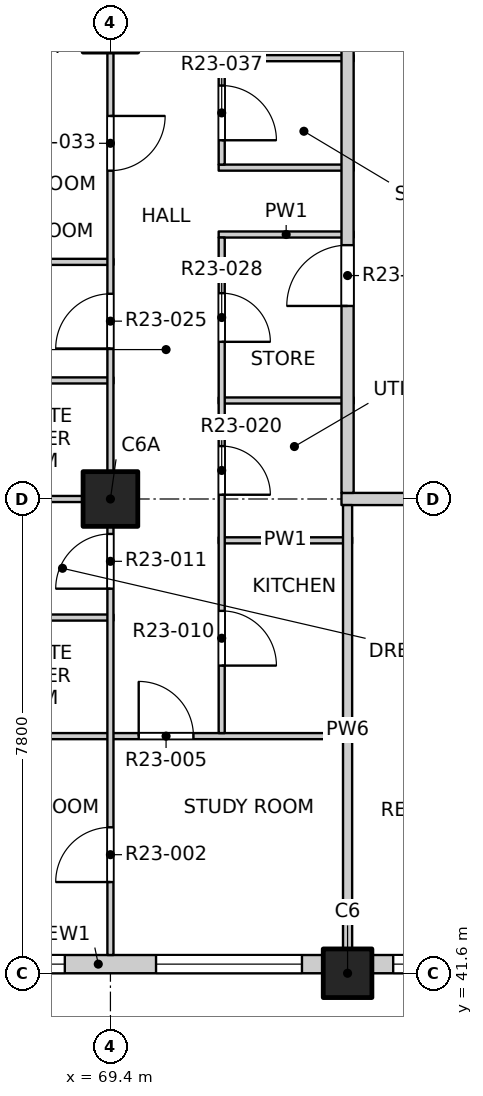
"""IFC4 building model, lengths in metres.
Left out: names, types, materials, properties, quantities, classifications, styles, units other than length and angle.
Written with IfcOpenShell. Run it as: python <this file> out.ifc"""

import sys

from ifc_helpers import new_model, si_unit, direction, frame, frame_2d, origin, origin_2d, place, context, subcontext, project, spatial, rectangle, extrude, element, fill, save


model = new_model("IFC4")
c1 = context("Model", 3, precision=1e-05, world=origin(), true_north=direction((0.0, 1.0)))
c2 = subcontext(c1, "Body", "Model", "MODEL_VIEW")
j1 = project(units=[si_unit("LENGTHUNIT", "METRE"), si_unit("PLANEANGLEUNIT", "RADIAN")], contexts=[c1])
p1 = place(None, origin())
s1 = spatial("IfcSite", under=j1, at=p1, CompositionType="ELEMENT")
p2 = place(p1, origin())
s2 = spatial("IfcBuilding", under=s1, at=p2, CompositionType="ELEMENT")
p3 = place(p2, frame((0.0, 0.0, 238.1)))
s3 = spatial("IfcBuildingStorey", under=s2, at=p3, CompositionType="ELEMENT", Elevation=238.1)
p4 = place(p3, frame((73.3, 41.6, -0.25), z_axis=(0.0, 0.0, 1.0), x_axis=(1.0, 0.0, 0.0)))
e1 = element("IfcColumn", 1, at=p4, inside=s3, PredefinedType="COLUMN", context=c2, shape_type="SweptSolid", body=[
    extrude(rectangle(XDim=0.8, YDim=0.8, at=origin_2d()), origin(), (0.0, 0.0, 1.0), 3.35),
])
p5 = place(p3, frame((69.4, 49.4, -0.25), z_axis=(0.0, 0.0, 1.0), x_axis=(1.0, 0.0, 0.0)))
e2 = element("IfcColumn", 2, at=p5, inside=s3, PredefinedType="COLUMN", context=c2, shape_type="SweptSolid", body=[
    extrude(rectangle(XDim=0.9, YDim=0.9, at=origin_2d()), origin(), (0.0, 0.0, 1.0), 3.35),
])
p6 = place(p3, frame((65.5, 41.75, 0.0), z_axis=(0.0, 0.0, 1.0), x_axis=(1.0, 0.0, 0.0)))
e3 = element("IfcWall", 3, at=p6, inside=s3, PredefinedType="SOLIDWALL", context=c2, shape_type="SweptSolid", body=[
    extrude(rectangle(XDim=7.4, YDim=0.3, at=frame_2d((3.7, 0.0))), origin(), (0.0, 0.0, 1.0), 3.1),
])
p7 = place(p6, frame((0.75, 0.0, 0.9)))
e4 = element("IfcOpeningElement", 4, at=p7, cuts=e3, PredefinedType="OPENING", context=c2, shape_type="SweptSolid", body=[
    extrude(rectangle(XDim=2.4, YDim=1.8, at=frame_2d((1.2, 0.9))), frame((0.0, 0.16, 0.0), z_axis=(0.0, -1.0, 0.0), x_axis=(1.0, 0.0, 0.0)), (0.0, 0.0, 1.0), 0.32),
])
p8 = place(p6, frame((4.65, 0.0, 0.9)))
e5 = element("IfcOpeningElement", 5, at=p8, cuts=e3, PredefinedType="OPENING", context=c2, shape_type="SweptSolid", body=[
    extrude(rectangle(XDim=2.4, YDim=1.8, at=frame_2d((1.2, 0.9))), frame((0.0, 0.16, 0.0), z_axis=(0.0, -1.0, 0.0), x_axis=(1.0, 0.0, 0.0)), (0.0, 0.0, 1.0), 0.32),
])
p9 = place(p3, frame((73.7, 41.75, 0.0), z_axis=(0.0, 0.0, 1.0), x_axis=(1.0, 0.0, 0.0)))
e6 = element("IfcWall", 6, at=p9, inside=s3, PredefinedType="SOLIDWALL", context=c2, shape_type="SweptSolid", body=[
    extrude(rectangle(XDim=7.0, YDim=0.3, at=frame_2d((3.5, 0.0))), origin(), (0.0, 0.0, 1.0), 3.1),
])
p10 = place(p9, frame((0.35, 0.0, 0.9)))
e7 = element("IfcOpeningElement", 7, at=p10, cuts=e6, PredefinedType="OPENING", context=c2, shape_type="SweptSolid", body=[
    extrude(rectangle(XDim=2.4, YDim=1.8, at=frame_2d((1.2, 0.9))), frame((0.0, 0.16, 0.0), z_axis=(0.0, -1.0, 0.0), x_axis=(1.0, 0.0, 0.0)), (0.0, 0.0, 1.0), 0.32),
])
p11 = place(p9, frame((4.25, 0.0, 0.9)))
e8 = element("IfcOpeningElement", 8, at=p11, cuts=e6, PredefinedType="OPENING", context=c2, shape_type="SweptSolid", body=[
    extrude(rectangle(XDim=2.4, YDim=1.8, at=frame_2d((1.2, 0.9))), frame((0.0, 0.16, 0.0), z_axis=(0.0, -1.0, 0.0), x_axis=(1.0, 0.0, 0.0)), (0.0, 0.0, 1.0), 0.32),
])
p12 = place(p3, frame((61.9, 45.5, 0.0), z_axis=(0.0, 0.0, 1.0), x_axis=(1.0, 0.0, 0.0)))
e9 = element("IfcWall", 9, at=p12, inside=s3, PredefinedType="PARTITIONING", context=c2, shape_type="SweptSolid", body=[
    extrude(rectangle(XDim=11.475, YDim=0.1, at=frame_2d((5.737, 0.0))), origin(), (0.0, 0.0, 1.0), 3.1),
])
p13 = place(p12, frame((7.965, 0.0, 0.0)))
e10 = element("IfcOpeningElement", 10, at=p13, cuts=e9, PredefinedType="OPENING", context=c2, shape_type="SweptSolid", body=[
    extrude(rectangle(XDim=0.9, YDim=2.1, at=frame_2d((0.45, 1.05))), frame((0.0, 0.06, 0.0), z_axis=(0.0, -1.0, 0.0), x_axis=(1.0, 0.0, 0.0)), (0.0, 0.0, 1.0), 0.12),
])
p14 = place(p3, frame((66.05, 47.45, 0.0), z_axis=(0.0, 0.0, 1.0), x_axis=(1.0, 0.0, 0.0)))
e11 = element("IfcWall", 11, at=p14, inside=s3, PredefinedType="PARTITIONING", context=c2, shape_type="SweptSolid", body=[
    extrude(rectangle(XDim=3.4, YDim=0.1, at=frame_2d((1.7, 0.0))), origin(), (0.0, 0.0, 1.0), 3.1),
])
p15 = place(p3, frame((71.18, 48.72, 0.0), z_axis=(0.0, 0.0, 1.0), x_axis=(1.0, 0.0, 0.0)))
e12 = element("IfcWall", 12, at=p15, inside=s3, PredefinedType="PARTITIONING", context=c2, shape_type="SweptSolid", body=[
    extrude(rectangle(XDim=2.195, YDim=0.1, at=frame_2d((1.097, 0.0))), origin(), (0.0, 0.0, 1.0), 3.1),
])
p16 = place(p3, frame((61.9, 49.4, 0.0), z_axis=(0.0, 0.0, 1.0), x_axis=(1.0, 0.0, 0.0)))
e13 = element("IfcWall", 13, at=p16, inside=s3, PredefinedType="PARTITIONING", context=c2, shape_type="SweptSolid", body=[
    extrude(rectangle(XDim=7.55, YDim=0.1, at=frame_2d((3.775, 0.0))), origin(), (0.0, 0.0, 1.0), 3.1),
])
p17 = place(p3, frame((73.2, 49.4, 0.0), z_axis=(0.0, 0.0, 1.0), x_axis=(1.0, 0.0, 0.0)))
e14 = element("IfcWall", 14, at=p17, inside=s3, PredefinedType="PARTITIONING", context=c2, shape_type="SweptSolid", body=[
    extrude(rectangle(XDim=23.6, YDim=0.2, at=frame_2d((11.8, 0.0))), origin(), (0.0, 0.0, 1.0), 3.1),
])
p18 = place(p17, frame((2.25, 0.0, 0.0)))
e15 = element("IfcOpeningElement", 15, at=p18, cuts=e14, PredefinedType="OPENING", context=c2, shape_type="SweptSolid", body=[
    extrude(rectangle(XDim=1.2, YDim=2.1, at=frame_2d((0.6, 1.05))), frame((0.0, 0.11, 0.0), z_axis=(0.0, -1.0, 0.0), x_axis=(1.0, 0.0, 0.0)), (0.0, 0.0, 1.0), 0.22),
])
p19 = place(p17, frame((9.4, 0.0, 0.0)))
e16 = element("IfcOpeningElement", 16, at=p19, cuts=e14, PredefinedType="OPENING", context=c2, shape_type="SweptSolid", body=[
    extrude(rectangle(XDim=0.9, YDim=2.1, at=frame_2d((0.45, 1.05))), frame((0.0, 0.11, 0.0), z_axis=(0.0, -1.0, 0.0), x_axis=(1.0, 0.0, 0.0)), (0.0, 0.0, 1.0), 0.22),
])
p20 = place(p17, frame((15.1, 0.0, 0.0)))
e17 = element("IfcOpeningElement", 17, at=p20, cuts=e14, PredefinedType="OPENING", context=c2, shape_type="SweptSolid", body=[
    extrude(rectangle(XDim=1.2, YDim=2.1, at=frame_2d((0.6, 1.05))), frame((0.0, 0.11, 0.0), z_axis=(0.0, -1.0, 0.0), x_axis=(1.0, 0.0, 0.0)), (0.0, 0.0, 1.0), 0.22),
])
p21 = place(p17, frame((21.1, 0.0, 0.0)))
e18 = element("IfcOpeningElement", 18, at=p21, cuts=e14, PredefinedType="OPENING", context=c2, shape_type="SweptSolid", body=[
    extrude(rectangle(XDim=0.9, YDim=2.1, at=frame_2d((0.45, 1.05))), frame((0.0, 0.11, 0.0), z_axis=(0.0, -1.0, 0.0), x_axis=(1.0, 0.0, 0.0)), (0.0, 0.0, 1.0), 0.22),
])
p22 = place(p3, frame((71.18, 51.02, 0.0), z_axis=(0.0, 0.0, 1.0), x_axis=(1.0, 0.0, 0.0)))
e19 = element("IfcWall", 19, at=p22, inside=s3, PredefinedType="PARTITIONING", context=c2, shape_type="SweptSolid", body=[
    extrude(rectangle(XDim=2.22, YDim=0.1, at=frame_2d((1.11, 0.0))), origin(), (0.0, 0.0, 1.0), 3.1),
])
p23 = place(p3, frame((66.05, 51.35, 0.0), z_axis=(0.0, 0.0, 1.0), x_axis=(1.0, 0.0, 0.0)))
e20 = element("IfcWall", 20, at=p23, inside=s3, PredefinedType="PARTITIONING", context=c2, shape_type="SweptSolid", body=[
    extrude(rectangle(XDim=3.4, YDim=0.1, at=frame_2d((1.7, 0.0))), origin(), (0.0, 0.0, 1.0), 3.1),
])
p24 = place(p3, frame((61.9, 53.3, 0.0), z_axis=(0.0, 0.0, 1.0), x_axis=(1.0, 0.0, 0.0)))
e21 = element("IfcWall", 21, at=p24, inside=s3, PredefinedType="PARTITIONING", context=c2, shape_type="SweptSolid", body=[
    extrude(rectangle(XDim=7.55, YDim=0.1, at=frame_2d((3.775, 0.0))), origin(), (0.0, 0.0, 1.0), 3.1),
])
for number, where, z_axis, x_axis in (
    (22, (71.18, 53.75, 0.0), (0.0, 0.0, 1.0), (1.0, 0.0, 0.0)),
    (23, (71.18, 54.85, 0.0), (0.0, 0.0, 1.0), (1.0, 0.0, 0.0)),
    (24, (71.18, 56.65, 0.0), (0.0, 0.0, 1.0), (1.0, 0.0, 0.0)),
):
    element("IfcWall", number, at=place(p3, frame(where, z_axis=z_axis, x_axis=x_axis)), inside=s3, PredefinedType="PARTITIONING", context=c2, shape_type="SweptSolid", body=[
        extrude(rectangle(XDim=2.22, YDim=0.1, at=frame_2d((1.11, 0.0))), origin(), (0.0, 0.0, 1.0), 3.1),
    ])
p25 = place(p3, frame((69.4, 41.9, 0.0), z_axis=(0.0, 0.0, 1.0), x_axis=(0.0, 1.0, 0.0)))
e25 = element("IfcWall", 25, at=p25, inside=s3, PredefinedType="PARTITIONING", context=c2, shape_type="SweptSolid", body=[
    extrude(rectangle(XDim=46.2, YDim=0.1, at=frame_2d((23.1, 0.0))), origin(), (0.0, 0.0, 1.0), 3.1),
])
p26 = place(p25, frame((1.2, 0.0, 0.0)))
e26 = element("IfcOpeningElement", 26, at=p26, cuts=e25, PredefinedType="OPENING", context=c2, shape_type="SweptSolid", body=[
    extrude(rectangle(XDim=0.9, YDim=2.1, at=frame_2d((0.45, 1.05))), frame((0.0, 0.06, 0.0), z_axis=(0.0, -1.0, 0.0), x_axis=(1.0, 0.0, 0.0)), (0.0, 0.0, 1.0), 0.12),
])
p27 = place(p25, frame((6.025, 0.0, 0.0)))
e27 = element("IfcOpeningElement", 27, at=p27, cuts=e25, PredefinedType="OPENING", context=c2, shape_type="SweptSolid", body=[
    extrude(rectangle(XDim=0.9, YDim=2.1, at=frame_2d((0.45, 1.05))), frame((0.0, 0.06, 0.0), z_axis=(0.0, -1.0, 0.0), x_axis=(1.0, 0.0, 0.0)), (0.0, 0.0, 1.0), 0.12),
])
p28 = place(p25, frame((9.975, 0.0, 0.0)))
e28 = element("IfcOpeningElement", 28, at=p28, cuts=e25, PredefinedType="OPENING", context=c2, shape_type="SweptSolid", body=[
    extrude(rectangle(XDim=0.9, YDim=2.1, at=frame_2d((0.45, 1.05))), frame((0.0, 0.06, 0.0), z_axis=(0.0, -1.0, 0.0), x_axis=(1.0, 0.0, 0.0)), (0.0, 0.0, 1.0), 0.12),
])
p29 = place(p25, frame((12.9, 0.0, 0.0)))
e29 = element("IfcOpeningElement", 29, at=p29, cuts=e25, PredefinedType="OPENING", context=c2, shape_type="SweptSolid", body=[
    extrude(rectangle(XDim=0.9, YDim=2.1, at=frame_2d((0.45, 1.05))), frame((0.0, 0.06, 0.0), z_axis=(0.0, -1.0, 0.0), x_axis=(1.0, 0.0, 0.0)), (0.0, 0.0, 1.0), 0.12),
])
p30 = place(p25, frame((17.775, 0.0, 0.0)))
e30 = element("IfcOpeningElement", 30, at=p30, cuts=e25, PredefinedType="OPENING", context=c2, shape_type="SweptSolid", body=[
    extrude(rectangle(XDim=0.9, YDim=2.1, at=frame_2d((0.45, 1.05))), frame((0.0, 0.06, 0.0), z_axis=(0.0, -1.0, 0.0), x_axis=(1.0, 0.0, 0.0)), (0.0, 0.0, 1.0), 0.12),
])
p31 = place(p25, frame((21.625, 0.0, 0.0)))
e31 = element("IfcOpeningElement", 31, at=p31, cuts=e25, PredefinedType="OPENING", context=c2, shape_type="SweptSolid", body=[
    extrude(rectangle(XDim=0.9, YDim=2.1, at=frame_2d((0.45, 1.05))), frame((0.0, 0.06, 0.0), z_axis=(0.0, -1.0, 0.0), x_axis=(1.0, 0.0, 0.0)), (0.0, 0.0, 1.0), 0.12),
])
p32 = place(p25, frame((25.575, 0.0, 0.0)))
e32 = element("IfcOpeningElement", 32, at=p32, cuts=e25, PredefinedType="OPENING", context=c2, shape_type="SweptSolid", body=[
    extrude(rectangle(XDim=0.9, YDim=2.1, at=frame_2d((0.45, 1.05))), frame((0.0, 0.06, 0.0), z_axis=(0.0, -1.0, 0.0), x_axis=(1.0, 0.0, 0.0)), (0.0, 0.0, 1.0), 0.12),
])
p33 = place(p25, frame((28.5, 0.0, 0.0)))
e33 = element("IfcOpeningElement", 33, at=p33, cuts=e25, PredefinedType="OPENING", context=c2, shape_type="SweptSolid", body=[
    extrude(rectangle(XDim=0.9, YDim=2.1, at=frame_2d((0.45, 1.05))), frame((0.0, 0.06, 0.0), z_axis=(0.0, -1.0, 0.0), x_axis=(1.0, 0.0, 0.0)), (0.0, 0.0, 1.0), 0.12),
])
p34 = place(p25, frame((32.4, 0.0, 0.0)))
e34 = element("IfcOpeningElement", 34, at=p34, cuts=e25, PredefinedType="OPENING", context=c2, shape_type="SweptSolid", body=[
    extrude(rectangle(XDim=0.9, YDim=2.1, at=frame_2d((0.45, 1.05))), frame((0.0, 0.06, 0.0), z_axis=(0.0, -1.0, 0.0), x_axis=(1.0, 0.0, 0.0)), (0.0, 0.0, 1.0), 0.12),
])
p35 = place(p25, frame((36.3, 0.0, 0.0)))
e35 = element("IfcOpeningElement", 35, at=p35, cuts=e25, PredefinedType="OPENING", context=c2, shape_type="SweptSolid", body=[
    extrude(rectangle(XDim=0.9, YDim=2.1, at=frame_2d((0.45, 1.05))), frame((0.0, 0.06, 0.0), z_axis=(0.0, -1.0, 0.0), x_axis=(1.0, 0.0, 0.0)), (0.0, 0.0, 1.0), 0.12),
])
p36 = place(p25, frame((40.2, 0.0, 0.0)))
e36 = element("IfcOpeningElement", 36, at=p36, cuts=e25, PredefinedType="OPENING", context=c2, shape_type="SweptSolid", body=[
    extrude(rectangle(XDim=0.9, YDim=2.1, at=frame_2d((0.45, 1.05))), frame((0.0, 0.06, 0.0), z_axis=(0.0, -1.0, 0.0), x_axis=(1.0, 0.0, 0.0)), (0.0, 0.0, 1.0), 0.12),
])
p37 = place(p25, frame((44.1, 0.0, 0.0)))
e37 = element("IfcOpeningElement", 37, at=p37, cuts=e25, PredefinedType="OPENING", context=c2, shape_type="SweptSolid", body=[
    extrude(rectangle(XDim=0.9, YDim=2.1, at=frame_2d((0.45, 1.05))), frame((0.0, 0.06, 0.0), z_axis=(0.0, -1.0, 0.0), x_axis=(1.0, 0.0, 0.0)), (0.0, 0.0, 1.0), 0.12),
])
p38 = place(p3, frame((71.23, 45.55, 0.0), z_axis=(0.0, 0.0, 1.0), x_axis=(0.0, 1.0, 0.0)))
e38 = element("IfcWall", 38, at=p38, inside=s3, PredefinedType="PARTITIONING", context=c2, shape_type="SweptSolid", body=[
    extrude(rectangle(XDim=8.15, YDim=0.1, at=frame_2d((4.075, 0.0))), origin(), (0.0, 0.0, 1.0), 3.1),
])
p39 = place(p38, frame((1.11, 0.0, 0.0)))
e39 = element("IfcOpeningElement", 39, at=p39, cuts=e38, PredefinedType="OPENING", context=c2, shape_type="SweptSolid", body=[
    extrude(rectangle(XDim=0.9, YDim=2.1, at=frame_2d((0.45, 1.05))), frame((0.0, 0.06, 0.0), z_axis=(0.0, -1.0, 0.0), x_axis=(1.0, 0.0, 0.0)), (0.0, 0.0, 1.0), 0.12),
])
p40 = place(p38, frame((3.92, 0.0, 0.0)))
e40 = element("IfcOpeningElement", 40, at=p40, cuts=e38, PredefinedType="OPENING", context=c2, shape_type="SweptSolid", body=[
    extrude(rectangle(XDim=0.8, YDim=2.1, at=frame_2d((0.4, 1.05))), frame((0.0, 0.06, 0.0), z_axis=(0.0, -1.0, 0.0), x_axis=(1.0, 0.0, 0.0)), (0.0, 0.0, 1.0), 0.12),
])
p41 = place(p38, frame((6.435, 0.0, 0.0)))
e41 = element("IfcOpeningElement", 41, at=p41, cuts=e38, PredefinedType="OPENING", context=c2, shape_type="SweptSolid", body=[
    extrude(rectangle(XDim=0.8, YDim=2.1, at=frame_2d((0.4, 1.05))), frame((0.0, 0.06, 0.0), z_axis=(0.0, -1.0, 0.0), x_axis=(1.0, 0.0, 0.0)), (0.0, 0.0, 1.0), 0.12),
])
p42 = place(p3, frame((71.23, 54.9, 0.0), z_axis=(0.0, 0.0, 1.0), x_axis=(0.0, 1.0, 0.0)))
e42 = element("IfcWall", 42, at=p42, inside=s3, PredefinedType="PARTITIONING", context=c2, shape_type="SweptSolid", body=[
    extrude(rectangle(XDim=7.85, YDim=0.1, at=frame_2d((3.925, 0.0))), origin(), (0.0, 0.0, 1.0), 3.1),
])
p43 = place(p42, frame((0.4, 0.0, 0.0)))
e43 = element("IfcOpeningElement", 43, at=p43, cuts=e42, PredefinedType="OPENING", context=c2, shape_type="SweptSolid", body=[
    extrude(rectangle(XDim=0.9, YDim=2.1, at=frame_2d((0.45, 1.05))), frame((0.0, 0.06, 0.0), z_axis=(0.0, -1.0, 0.0), x_axis=(1.0, 0.0, 0.0)), (0.0, 0.0, 1.0), 0.12),
])
p44 = place(p42, frame((2.45, 0.0, 0.0)))
e44 = element("IfcOpeningElement", 44, at=p44, cuts=e42, PredefinedType="OPENING", context=c2, shape_type="SweptSolid", body=[
    extrude(rectangle(XDim=0.9, YDim=2.1, at=frame_2d((0.45, 1.05))), frame((0.0, 0.06, 0.0), z_axis=(0.0, -1.0, 0.0), x_axis=(1.0, 0.0, 0.0)), (0.0, 0.0, 1.0), 0.12),
])
p45 = place(p42, frame((4.725, 0.0, 0.0)))
e45 = element("IfcOpeningElement", 45, at=p45, cuts=e42, PredefinedType="OPENING", context=c2, shape_type="SweptSolid", body=[
    extrude(rectangle(XDim=0.8, YDim=2.1, at=frame_2d((0.4, 1.05))), frame((0.0, 0.06, 0.0), z_axis=(0.0, -1.0, 0.0), x_axis=(1.0, 0.0, 0.0)), (0.0, 0.0, 1.0), 0.12),
])
p46 = place(p42, frame((6.65, 0.0, 0.0)))
e46 = element("IfcOpeningElement", 46, at=p46, cuts=e42, PredefinedType="OPENING", context=c2, shape_type="SweptSolid", body=[
    extrude(rectangle(XDim=0.8, YDim=2.1, at=frame_2d((0.4, 1.05))), frame((0.0, 0.06, 0.0), z_axis=(0.0, -1.0, 0.0), x_axis=(1.0, 0.0, 0.0)), (0.0, 0.0, 1.0), 0.12),
])
p47 = place(p3, frame((73.3, 41.9, 0.0), z_axis=(0.0, 0.0, 1.0), x_axis=(0.0, 1.0, 0.0)))
e47 = element("IfcWall", 47, at=p47, inside=s3, PredefinedType="PARTITIONING", context=c2, shape_type="SweptSolid", body=[
    extrude(rectangle(XDim=7.4, YDim=0.15, at=frame_2d((3.7, 0.0))), origin(), (0.0, 0.0, 1.0), 3.1),
])
p48 = place(p3, frame((73.3, 49.5, 0.0), z_axis=(0.0, 0.0, 1.0), x_axis=(0.0, 1.0, 0.0)))
e48 = element("IfcWall", 48, at=p48, inside=s3, PredefinedType="PARTITIONING", context=c2, shape_type="SweptSolid", body=[
    extrude(rectangle(XDim=34.9, YDim=0.2, at=frame_2d((17.45, 0.0))), origin(), (0.0, 0.0, 1.0), 3.1),
])
p49 = place(p48, frame((3.075, 0.0, 0.0)))
e49 = element("IfcOpeningElement", 49, at=p49, cuts=e48, PredefinedType="OPENING", context=c2, shape_type="SweptSolid", body=[
    extrude(rectangle(XDim=1.0, YDim=2.1, at=frame_2d((0.5, 1.05))), frame((0.0, 0.11, 0.0), z_axis=(0.0, -1.0, 0.0), x_axis=(1.0, 0.0, 0.0)), (0.0, 0.0, 1.0), 0.22),
])
p50 = place(p48, frame((14.575, 0.0, 0.0)))
e50 = element("IfcOpeningElement", 50, at=p50, cuts=e48, PredefinedType="OPENING", context=c2, shape_type="SweptSolid", body=[
    extrude(rectangle(XDim=1.0, YDim=2.1, at=frame_2d((0.5, 1.05))), frame((0.0, 0.11, 0.0), z_axis=(0.0, -1.0, 0.0), x_axis=(1.0, 0.0, 0.0)), (0.0, 0.0, 1.0), 0.22),
])
p51 = place(p48, frame((33.625, 0.0, 0.0)))
e51 = element("IfcOpeningElement", 51, at=p51, cuts=e48, PredefinedType="OPENING", context=c2, shape_type="SweptSolid", body=[
    extrude(rectangle(XDim=1.0, YDim=2.1, at=frame_2d((0.5, 1.05))), frame((0.0, 0.11, 0.0), z_axis=(0.0, -1.0, 0.0), x_axis=(1.0, 0.0, 0.0)), (0.0, 0.0, 1.0), 0.22),
])
p52 = place(p7, origin())
e52 = element("IfcWindow", 52, at=p52, inside=s3, PartitioningType="DOUBLE_PANEL_VERTICAL", PredefinedType="WINDOW", context=c2, shape_type="SweptSolid", body=[
    extrude(rectangle(XDim=2.4, YDim=1.8, at=frame_2d((1.2, 0.9))), frame((0.0, 0.03, 0.0), z_axis=(0.0, -1.0, 0.0), x_axis=(1.0, 0.0, 0.0)), (0.0, 0.0, 1.0), 0.06),
])
fill(e4, e52)
p53 = place(p8, origin())
e53 = element("IfcWindow", 53, at=p53, inside=s3, PartitioningType="DOUBLE_PANEL_VERTICAL", PredefinedType="WINDOW", context=c2, shape_type="SweptSolid", body=[
    extrude(rectangle(XDim=2.4, YDim=1.8, at=frame_2d((1.2, 0.9))), frame((0.0, 0.03, 0.0), z_axis=(0.0, -1.0, 0.0), x_axis=(1.0, 0.0, 0.0)), (0.0, 0.0, 1.0), 0.06),
])
fill(e5, e53)
p54 = place(p10, origin())
e54 = element("IfcWindow", 54, at=p54, inside=s3, PartitioningType="DOUBLE_PANEL_VERTICAL", PredefinedType="WINDOW", context=c2, shape_type="SweptSolid", body=[
    extrude(rectangle(XDim=2.4, YDim=1.8, at=frame_2d((1.2, 0.9))), frame((0.0, 0.03, 0.0), z_axis=(0.0, -1.0, 0.0), x_axis=(1.0, 0.0, 0.0)), (0.0, 0.0, 1.0), 0.06),
])
fill(e7, e54)
p55 = place(p26, origin())
e55 = element("IfcDoor", 55, at=p55, inside=s3, OperationType="SINGLE_SWING_LEFT", PredefinedType="DOOR", context=c2, shape_type="SweptSolid", body=[
    extrude(rectangle(XDim=0.9, YDim=2.1, at=frame_2d((0.45, 1.05))), frame((0.0, 0.025, 0.0), z_axis=(0.0, -1.0, 0.0), x_axis=(1.0, 0.0, 0.0)), (0.0, 0.0, 1.0), 0.05),
])
fill(e26, e55)
p56 = place(p13, origin())
e56 = element("IfcDoor", 56, at=p56, inside=s3, OperationType="SINGLE_SWING_LEFT", PredefinedType="DOOR", context=c2, shape_type="SweptSolid", body=[
    extrude(rectangle(XDim=0.9, YDim=2.1, at=frame_2d((0.45, 1.05))), frame((0.0, 0.025, 0.0), z_axis=(0.0, -1.0, 0.0), x_axis=(1.0, 0.0, 0.0)), (0.0, 0.0, 1.0), 0.05),
])
fill(e10, e56)
p57 = place(p39, origin())
e57 = element("IfcDoor", 57, at=p57, inside=s3, OperationType="SINGLE_SWING_RIGHT", PredefinedType="DOOR", context=c2, shape_type="SweptSolid", body=[
    extrude(rectangle(XDim=0.9, YDim=2.1, at=frame_2d((0.45, 1.05))), frame((0.0, 0.025, 0.0), z_axis=(0.0, -1.0, 0.0), x_axis=(1.0, 0.0, 0.0)), (0.0, 0.0, 1.0), 0.05),
])
fill(e39, e57)
p58 = place(p27, origin())
e58 = element("IfcDoor", 58, at=p58, inside=s3, OperationType="SINGLE_SWING_LEFT", PredefinedType="DOOR", context=c2, shape_type="SweptSolid", body=[
    extrude(rectangle(XDim=0.9, YDim=2.1, at=frame_2d((0.45, 1.05))), frame((0.0, 0.025, 0.0), z_axis=(0.0, -1.0, 0.0), x_axis=(1.0, 0.0, 0.0)), (0.0, 0.0, 1.0), 0.05),
])
fill(e27, e58)
p59 = place(p40, origin())
e59 = element("IfcDoor", 59, at=p59, inside=s3, OperationType="SINGLE_SWING_RIGHT", PredefinedType="DOOR", context=c2, shape_type="SweptSolid", body=[
    extrude(rectangle(XDim=0.8, YDim=2.1, at=frame_2d((0.4, 1.05))), frame((0.0, 0.025, 0.0), z_axis=(0.0, -1.0, 0.0), x_axis=(1.0, 0.0, 0.0)), (0.0, 0.0, 1.0), 0.05),
])
fill(e40, e59)
p60 = place(p28, origin())
e60 = element("IfcDoor", 60, at=p60, inside=s3, OperationType="SINGLE_SWING_LEFT", PredefinedType="DOOR", context=c2, shape_type="SweptSolid", body=[
    extrude(rectangle(XDim=0.9, YDim=2.1, at=frame_2d((0.45, 1.05))), frame((0.0, 0.025, 0.0), z_axis=(0.0, -1.0, 0.0), x_axis=(1.0, 0.0, 0.0)), (0.0, 0.0, 1.0), 0.05),
])
fill(e28, e60)
p61 = place(p41, origin())
e61 = element("IfcDoor", 61, at=p61, inside=s3, OperationType="SINGLE_SWING_RIGHT", PredefinedType="DOOR", context=c2, shape_type="SweptSolid", body=[
    extrude(rectangle(XDim=0.8, YDim=2.1, at=frame_2d((0.4, 1.05))), frame((0.0, 0.025, 0.0), z_axis=(0.0, -1.0, 0.0), x_axis=(1.0, 0.0, 0.0)), (0.0, 0.0, 1.0), 0.05),
])
fill(e41, e61)
p62 = place(p49, origin())
e62 = element("IfcDoor", 62, at=p62, inside=s3, OperationType="SINGLE_SWING_LEFT", PredefinedType="DOOR", context=c2, shape_type="SweptSolid", body=[
    extrude(rectangle(XDim=1.0, YDim=2.1, at=frame_2d((0.5, 1.05))), frame((0.0, 0.025, 0.0), z_axis=(0.0, -1.0, 0.0), x_axis=(1.0, 0.0, 0.0)), (0.0, 0.0, 1.0), 0.05),
])
fill(e49, e62)
p63 = place(p29, origin())
e63 = element("IfcDoor", 63, at=p63, inside=s3, OperationType="SINGLE_SWING_LEFT", PredefinedType="DOOR", context=c2, shape_type="SweptSolid", body=[
    extrude(rectangle(XDim=0.9, YDim=2.1, at=frame_2d((0.45, 1.05))), frame((0.0, 0.025, 0.0), z_axis=(0.0, -1.0, 0.0), x_axis=(1.0, 0.0, 0.0)), (0.0, 0.0, 1.0), 0.05),
])
fill(e29, e63)
p64 = place(p43, origin())
e64 = element("IfcDoor", 64, at=p64, inside=s3, OperationType="SINGLE_SWING_RIGHT", PredefinedType="DOOR", context=c2, shape_type="SweptSolid", body=[
    extrude(rectangle(XDim=0.9, YDim=2.1, at=frame_2d((0.45, 1.05))), frame((0.0, 0.025, 0.0), z_axis=(0.0, -1.0, 0.0), x_axis=(1.0, 0.0, 0.0)), (0.0, 0.0, 1.0), 0.05),
])
fill(e43, e64)
save(model, sys.argv[1])
